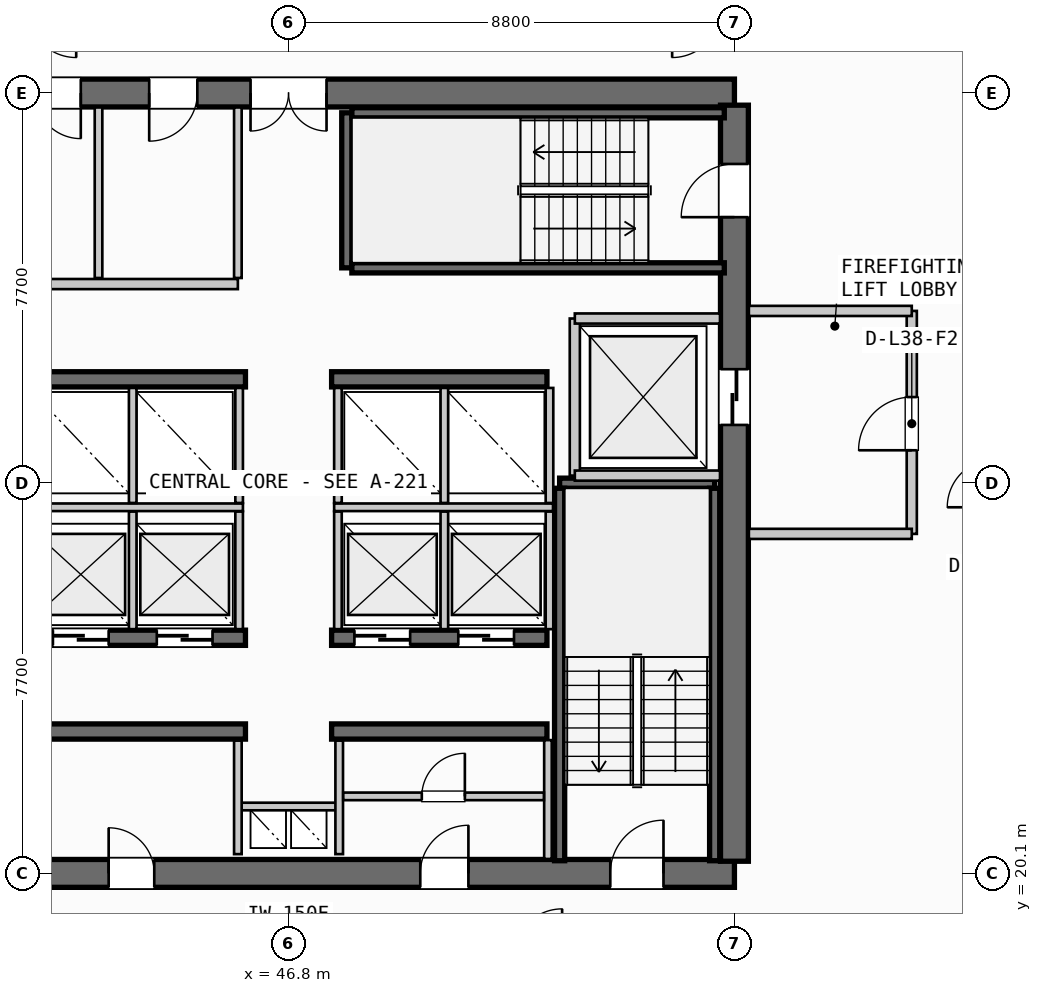
"""IFC4 building model, lengths in metres.
Left out: names, types, materials, properties, quantities, classifications, styles, units other than length and angle.
Written with IfcOpenShell. Run it as: python <this file> out.ifc"""

import sys

from ifc_helpers import new_model, si_unit, direction, frame, frame_2d, origin, place, context, subcontext, project, spatial, rectangle, extrude, source, transform, mapped, element, fill, save


model = new_model("IFC4")
c1 = context("Model", 3, precision=1e-05, world=origin(), true_north=direction((0.0, 1.0)))
c2 = subcontext(c1, "Body", "Model", "MODEL_VIEW")
j1 = project(units=[si_unit("LENGTHUNIT", "METRE"), si_unit("PLANEANGLEUNIT", "RADIAN")], contexts=[c1])
p1 = place(None, origin())
s1 = spatial("IfcSite", under=j1, at=p1, CompositionType="ELEMENT")
p2 = place(p1, origin())
s2 = spatial("IfcBuilding", under=s1, at=p2, CompositionType="ELEMENT")
p3 = place(p2, frame((0.0, 0.0, 150.1)))
s3 = spatial("IfcBuildingStorey", under=s2, at=p3, CompositionType="ELEMENT", Elevation=150.1)
p4 = place(p3, frame((38.0, 20.1, 0.0), z_axis=(0.0, 0.0, 1.0), x_axis=(1.0, 0.0, 0.0)))
e1 = element("IfcWall", 1, at=p4, inside=s3, PredefinedType="SHEAR", context=c2, shape_type="SweptSolid", body=[
    extrude(rectangle(XDim=17.6, YDim=0.55, at=frame_2d((8.8, 0.0))), origin(), (0.0, 0.0, 1.0), 3.3),
])
p5 = place(p4, frame((1.4, 0.0, 0.0)))
e2 = element("IfcOpeningElement", 2, at=p5, cuts=e1, PredefinedType="OPENING", context=c2, shape_type="SweptSolid", body=[
    extrude(rectangle(XDim=1.05, YDim=2.15, at=frame_2d((0.525, 1.075))), frame((0.0, 0.285, 0.0), z_axis=(0.0, -1.0, 0.0), x_axis=(1.0, 0.0, 0.0)), (0.0, 0.0, 1.0), 0.57),
])
p6 = place(p4, frame((15.15, 0.0, 0.0)))
e3 = element("IfcOpeningElement", 3, at=p6, cuts=e1, PredefinedType="OPENING", context=c2, shape_type="SweptSolid", body=[
    extrude(rectangle(XDim=1.05, YDim=2.15, at=frame_2d((0.525, 1.075))), frame((0.0, 0.285, 0.0), z_axis=(0.0, -1.0, 0.0), x_axis=(1.0, 0.0, 0.0)), (0.0, 0.0, 1.0), 0.57),
])
p7 = place(p4, frame((5.25, 0.0, 0.0)))
e4 = element("IfcOpeningElement", 4, at=p7, cuts=e1, PredefinedType="OPENING", context=c2, shape_type="SweptSolid", body=[
    extrude(rectangle(XDim=0.9, YDim=2.15, at=frame_2d((0.45, 1.075))), frame((0.0, 0.285, 0.0), z_axis=(0.0, -1.0, 0.0), x_axis=(1.0, 0.0, 0.0)), (0.0, 0.0, 1.0), 0.57),
])
p8 = place(p4, frame((11.4, 0.0, 0.0)))
e5 = element("IfcOpeningElement", 5, at=p8, cuts=e1, PredefinedType="OPENING", context=c2, shape_type="SweptSolid", body=[
    extrude(rectangle(XDim=0.95, YDim=2.15, at=frame_2d((0.475, 1.075))), frame((0.0, 0.285, 0.0), z_axis=(0.0, -1.0, 0.0), x_axis=(1.0, 0.0, 0.0)), (0.0, 0.0, 1.0), 0.57),
])
p9 = place(p3, frame((55.6, 35.5, 0.0), z_axis=(0.0, 0.0, 1.0), x_axis=(-1.0, 0.0, 0.0)))
e6 = element("IfcWall", 6, at=p9, inside=s3, PredefinedType="SHEAR", context=c2, shape_type="SweptSolid", body=[
    extrude(rectangle(XDim=17.6, YDim=0.55, at=frame_2d((8.8, 0.0))), origin(), (0.0, 0.0, 1.0), 3.3),
])
p10 = place(p9, frame((8.05, 0.0, 0.0)))
e7 = element("IfcOpeningElement", 7, at=p10, cuts=e6, PredefinedType="OPENING", context=c2, shape_type="SweptSolid", body=[
    extrude(rectangle(XDim=1.5, YDim=2.2, at=frame_2d((0.75, 1.1))), frame((0.0, 0.285, 0.0), z_axis=(0.0, -1.0, 0.0), x_axis=(1.0, 0.0, 0.0)), (0.0, 0.0, 1.0), 0.57),
])
p11 = place(p9, frame((14.95, 0.0, 0.0)))
e8 = element("IfcOpeningElement", 8, at=p11, cuts=e6, PredefinedType="OPENING", context=c2, shape_type="SweptSolid", body=[
    extrude(rectangle(XDim=1.4, YDim=2.3, at=frame_2d((0.7, 1.15))), frame((0.0, 0.285, 0.0), z_axis=(0.0, -1.0, 0.0), x_axis=(1.0, 0.0, 0.0)), (0.0, 0.0, 1.0), 0.57),
])
p12 = place(p9, frame((12.9, 0.0, 0.0)))
e9 = element("IfcOpeningElement", 9, at=p12, cuts=e6, PredefinedType="OPENING", context=c2, shape_type="SweptSolid", body=[
    extrude(rectangle(XDim=0.9, YDim=2.15, at=frame_2d((0.45, 1.075))), frame((0.0, 0.285, 0.0), z_axis=(0.0, -1.0, 0.0), x_axis=(1.0, 0.0, 0.0)), (0.0, 0.0, 1.0), 0.57),
])
p13 = place(p9, frame((10.6, 0.0, 0.0)))
e10 = element("IfcOpeningElement", 10, at=p13, cuts=e6, PredefinedType="OPENING", context=c2, shape_type="SweptSolid", body=[
    extrude(rectangle(XDim=0.95, YDim=2.15, at=frame_2d((0.475, 1.075))), frame((0.0, 0.285, 0.0), z_axis=(0.0, -1.0, 0.0), x_axis=(1.0, 0.0, 0.0)), (0.0, 0.0, 1.0), 0.57),
])
p14 = place(p3, frame((55.6, 20.34, 0.0), z_axis=(0.0, 0.0, 1.0), x_axis=(0.0, 1.0, 0.0)))
e11 = element("IfcWall", 11, at=p14, inside=s3, PredefinedType="SHEAR", context=c2, shape_type="SweptSolid", body=[
    extrude(rectangle(XDim=14.92, YDim=0.55, at=frame_2d((7.46, 0.0))), origin(), (0.0, 0.0, 1.0), 3.3),
])
p15 = place(p14, frame((12.71, 0.0, 0.0)))
e12 = element("IfcOpeningElement", 12, at=p15, cuts=e11, PredefinedType="OPENING", context=c2, shape_type="SweptSolid", body=[
    extrude(rectangle(XDim=1.05, YDim=2.15, at=frame_2d((0.525, 1.075))), frame((0.0, 0.285, 0.0), z_axis=(0.0, -1.0, 0.0), x_axis=(1.0, 0.0, 0.0)), (0.0, 0.0, 1.0), 0.57),
])
p16 = place(p14, frame((8.61, 0.0, 0.0)))
e13 = element("IfcOpeningElement", 13, at=p16, cuts=e11, PredefinedType="OPENING", context=c2, shape_type="SweptSolid", body=[
    extrude(rectangle(XDim=1.1, YDim=2.2, at=frame_2d((0.55, 1.1))), frame((0.0, 0.285, 0.0), z_axis=(0.0, -1.0, 0.0), x_axis=(1.0, 0.0, 0.0)), (0.0, 0.0, 1.0), 0.57),
])
for number, where, z_axis, x_axis in (
    (14, (41.7, 22.9, 0.0), (0.0, 0.0, 1.0), (1.0, 0.0, 0.0)),
    (15, (47.65, 22.9, 0.0), (0.0, 0.0, 1.0), (1.0, 0.0, 0.0)),
):
    element("IfcWall", number, at=place(p3, frame(where, z_axis=z_axis, x_axis=x_axis)), inside=s3, PredefinedType="SHEAR", context=c2, shape_type="SweptSolid", body=[
        extrude(rectangle(XDim=4.25, YDim=0.3, at=frame_2d((2.125, 0.0))), origin(), (0.0, 0.0, 1.0), 3.3),
    ])
p17 = place(p3, frame((41.7, 24.75, 0.0), z_axis=(0.0, 0.0, 1.0), x_axis=(1.0, 0.0, 0.0)))
e16 = element("IfcWall", 16, at=p17, inside=s3, PredefinedType="SHEAR", context=c2, shape_type="SweptSolid", body=[
    extrude(rectangle(XDim=4.25, YDim=0.3, at=frame_2d((2.125, 0.0))), origin(), (0.0, 0.0, 1.0), 3.3),
])
p18 = place(p17, frame((0.45, 0.0, 0.0)))
e17 = element("IfcOpeningElement", 17, at=p18, cuts=e16, PredefinedType="OPENING", context=c2, shape_type="SweptSolid", body=[
    extrude(rectangle(XDim=1.1, YDim=2.2, at=frame_2d((0.55, 1.1))), frame((0.0, 0.16, 0.0), z_axis=(0.0, -1.0, 0.0), x_axis=(1.0, 0.0, 0.0)), (0.0, 0.0, 1.0), 0.32),
])
p19 = place(p17, frame((2.5, 0.0, 0.0)))
e18 = element("IfcOpeningElement", 18, at=p19, cuts=e16, PredefinedType="OPENING", context=c2, shape_type="SweptSolid", body=[
    extrude(rectangle(XDim=1.1, YDim=2.2, at=frame_2d((0.55, 1.1))), frame((0.0, 0.16, 0.0), z_axis=(0.0, -1.0, 0.0), x_axis=(1.0, 0.0, 0.0)), (0.0, 0.0, 1.0), 0.32),
])
p20 = place(p3, frame((47.65, 24.75, 0.0), z_axis=(0.0, 0.0, 1.0), x_axis=(1.0, 0.0, 0.0)))
e19 = element("IfcWall", 19, at=p20, inside=s3, PredefinedType="SHEAR", context=c2, shape_type="SweptSolid", body=[
    extrude(rectangle(XDim=4.25, YDim=0.3, at=frame_2d((2.125, 0.0))), origin(), (0.0, 0.0, 1.0), 3.3),
])
p21 = place(p20, frame((0.45, 0.0, 0.0)))
e20 = element("IfcOpeningElement", 20, at=p21, cuts=e19, PredefinedType="OPENING", context=c2, shape_type="SweptSolid", body=[
    extrude(rectangle(XDim=1.1, YDim=2.2, at=frame_2d((0.55, 1.1))), frame((0.0, 0.16, 0.0), z_axis=(0.0, -1.0, 0.0), x_axis=(1.0, 0.0, 0.0)), (0.0, 0.0, 1.0), 0.32),
])
p22 = place(p20, frame((2.5, 0.0, 0.0)))
e21 = element("IfcOpeningElement", 21, at=p22, cuts=e19, PredefinedType="OPENING", context=c2, shape_type="SweptSolid", body=[
    extrude(rectangle(XDim=1.1, YDim=2.2, at=frame_2d((0.55, 1.1))), frame((0.0, 0.16, 0.0), z_axis=(0.0, -1.0, 0.0), x_axis=(1.0, 0.0, 0.0)), (0.0, 0.0, 1.0), 0.32),
])
for number, where, z_axis, x_axis in (
    (22, (41.7, 29.85, 0.0), (0.0, 0.0, 1.0), (1.0, 0.0, 0.0)),
    (23, (47.65, 29.85, 0.0), (0.0, 0.0, 1.0), (1.0, 0.0, 0.0)),
):
    element("IfcWall", number, at=place(p3, frame(where, z_axis=z_axis, x_axis=x_axis)), inside=s3, PredefinedType="SHEAR", context=c2, shape_type="SweptSolid", body=[
        extrude(rectangle(XDim=4.25, YDim=0.3, at=frame_2d((2.125, 0.0))), origin(), (0.0, 0.0, 1.0), 3.3),
    ])
p23 = place(p3, frame((52.15, 27.8, 0.0), z_axis=(0.0, 0.0, 1.0), x_axis=(1.0, 0.0, 0.0)))
e24 = element("IfcWall", 24, at=p23, inside=s3, PredefinedType="SHEAR", context=c2, shape_type="SweptSolid", body=[
    extrude(rectangle(XDim=3.06, YDim=0.2, at=frame_2d((1.53, 0.0))), origin(), (0.0, 0.0, 1.0), 3.3),
])
for number, where, z_axis, x_axis in (
    (25, (55.21, 27.7, 0.0), (0.0, 0.0, 1.0), (0.0, -1.0, 0.0)),
    (26, (52.15, 20.35, 0.0), (0.0, 0.0, 1.0), (0.0, 1.0, 0.0)),
):
    element("IfcWall", number, at=place(p3, frame(where, z_axis=z_axis, x_axis=x_axis)), inside=s3, PredefinedType="SHEAR", context=c2, shape_type="SweptSolid", body=[
        extrude(rectangle(XDim=7.35, YDim=0.2, at=frame_2d((3.675, 0.0))), origin(), (0.0, 0.0, 1.0), 3.3),
    ])
p24 = place(p3, frame((47.95, 32.05, 0.0), z_axis=(0.0, 0.0, 1.0), x_axis=(0.0, 1.0, 0.0)))
e27 = element("IfcWall", 27, at=p24, inside=s3, PredefinedType="SHEAR", context=c2, shape_type="SweptSolid", body=[
    extrude(rectangle(XDim=3.06, YDim=0.2, at=frame_2d((1.53, 0.0))), origin(), (0.0, 0.0, 1.0), 3.3),
])
for number, where, z_axis, x_axis in (
    (28, (48.05, 35.11, 0.0), (0.0, 0.0, 1.0), (1.0, 0.0, 0.0)),
    (29, (55.4, 32.05, 0.0), (0.0, 0.0, 1.0), (-1.0, 0.0, 0.0)),
):
    element("IfcWall", number, at=place(p3, frame(where, z_axis=z_axis, x_axis=x_axis)), inside=s3, PredefinedType="SHEAR", context=c2, shape_type="SweptSolid", body=[
        extrude(rectangle(XDim=7.35, YDim=0.2, at=frame_2d((3.675, 0.0))), origin(), (0.0, 0.0, 1.0), 3.3),
    ])
p25 = place(p3, frame((45.8, 21.42, 0.0), z_axis=(0.0, 0.0, 1.0), x_axis=(1.0, 0.0, 0.0)))
e30 = element("IfcWall", 30, at=p25, inside=s3, PredefinedType="PARTITIONING", context=c2, shape_type="SweptSolid", body=[
    extrude(rectangle(XDim=2.0, YDim=0.15, at=frame_2d((1.0, 0.0))), origin(), (0.0, 0.0, 1.0), 2.28),
])
for number, where, z_axis, x_axis in (
    (31, (45.8, 20.48, 0.0), (0.0, 0.0, 1.0), (0.0, 1.0, 0.0)),
    (32, (47.8, 20.48, 0.0), (0.0, 0.0, 1.0), (0.0, 1.0, 0.0)),
):
    element("IfcWall", number, at=place(p3, frame(where, z_axis=z_axis, x_axis=x_axis)), inside=s3, PredefinedType="PARTITIONING", context=c2, shape_type="SweptSolid", body=[
        extrude(rectangle(XDim=2.24, YDim=0.15, at=frame_2d((1.12, 0.0))), origin(), (0.0, 0.0, 1.0), 2.28),
    ])
p26 = place(p3, frame((52.45, 27.95, 0.0), z_axis=(0.0, 0.0, 1.0), x_axis=(0.0, 1.0, 0.0)))
e33 = element("IfcWall", 33, at=p26, inside=s3, PredefinedType="PARTITIONING", context=c2, shape_type="SweptSolid", body=[
    extrude(rectangle(XDim=3.1, YDim=0.2, at=frame_2d((1.55, 0.0))), origin(), (0.0, 0.0, 1.0), 2.28),
])
for number, where, z_axis, x_axis in (
    (34, (52.45, 27.95, 0.0), (0.0, 0.0, 1.0), (1.0, 0.0, 0.0)),
    (35, (52.45, 31.05, 0.0), (0.0, 0.0, 1.0), (1.0, 0.0, 0.0)),
):
    element("IfcWall", number, at=place(p3, frame(where, z_axis=z_axis, x_axis=x_axis)), inside=s3, PredefinedType="PARTITIONING", context=c2, shape_type="SweptSolid", body=[
        extrude(rectangle(XDim=2.865, YDim=0.2, at=frame_2d((1.433, 0.0))), origin(), (0.0, 0.0, 1.0), 2.28),
    ])
p27 = place(p3, frame((59.1, 26.8, 0.0), z_axis=(0.0, 0.0, 1.0), x_axis=(0.0, 1.0, 0.0)))
e36 = element("IfcWall", 36, at=p27, inside=s3, PredefinedType="PARTITIONING", context=c2, shape_type="SweptSolid", body=[
    extrude(rectangle(XDim=4.4, YDim=0.2, at=frame_2d((2.2, 0.0))), origin(), (0.0, 0.0, 1.0), 2.28),
])
p28 = place(p27, frame((1.65, 0.0, 0.0)))
e37 = element("IfcOpeningElement", 37, at=p28, cuts=e36, PredefinedType="OPENING", context=c2, shape_type="SweptSolid", body=[
    extrude(rectangle(XDim=1.05, YDim=2.15, at=frame_2d((0.525, 1.075))), frame((0.0, 0.11, 0.0), z_axis=(0.0, -1.0, 0.0), x_axis=(1.0, 0.0, 0.0)), (0.0, 0.0, 1.0), 0.22),
])
for number, where, z_axis, x_axis in (
    (38, (55.885, 26.8, 0.0), (0.0, 0.0, 1.0), (1.0, 0.0, 0.0)),
    (39, (55.885, 31.2, 0.0), (0.0, 0.0, 1.0), (1.0, 0.0, 0.0)),
):
    element("IfcWall", number, at=place(p3, frame(where, z_axis=z_axis, x_axis=x_axis)), inside=s3, PredefinedType="PARTITIONING", context=c2, shape_type="SweptSolid", body=[
        extrude(rectangle(XDim=3.215, YDim=0.2, at=frame_2d((1.607, 0.0))), origin(), (0.0, 0.0, 1.0), 2.28),
    ])
p29 = place(p3, frame((51.92, 20.385, 0.0), z_axis=(0.0, 0.0, 1.0), x_axis=(0.0, 1.0, 0.0)))
e40 = element("IfcWall", 40, at=p29, inside=s3, PredefinedType="PARTITIONING", context=c2, shape_type="SweptSolid", body=[
    extrude(rectangle(XDim=2.345, YDim=0.15, at=frame_2d((1.172, 0.0))), origin(), (0.0, 0.0, 1.0), 2.28),
])
p30 = place(p3, frame((47.88, 21.62, 0.0), z_axis=(0.0, 0.0, 1.0), x_axis=(1.0, 0.0, 0.0)))
e41 = element("IfcWall", 41, at=p30, inside=s3, PredefinedType="PARTITIONING", context=c2, shape_type="SweptSolid", body=[
    extrude(rectangle(XDim=3.96, YDim=0.15, at=frame_2d((1.98, 0.0))), origin(), (0.0, 0.0, 1.0), 2.28),
])
p31 = place(p30, frame((1.55, 0.0, 0.0)))
e42 = element("IfcOpeningElement", 42, at=p31, cuts=e41, PredefinedType="OPENING", context=c2, shape_type="SweptSolid", body=[
    extrude(rectangle(XDim=0.85, YDim=2.15, at=frame_2d((0.425, 1.075))), frame((0.0, 0.085, 0.0), z_axis=(0.0, -1.0, 0.0), x_axis=(1.0, 0.0, 0.0)), (0.0, 0.0, 1.0), 0.17),
])
p32 = place(p3, frame((41.58, 27.325, 0.0), z_axis=(0.0, 0.0, 1.0), x_axis=(1.0, 0.0, 0.0)))
e43 = element("IfcWall", 43, at=p32, inside=s3, PredefinedType="PARTITIONING", context=c2, shape_type="SweptSolid", body=[
    extrude(rectangle(XDim=4.32, YDim=0.15, at=frame_2d((2.16, 0.0))), origin(), (0.0, 0.0, 1.0), 2.28),
])
p33 = place(p3, frame((47.7, 27.325, 0.0), z_axis=(0.0, 0.0, 1.0), x_axis=(1.0, 0.0, 0.0)))
e44 = element("IfcWall", 44, at=p33, inside=s3, PredefinedType="PARTITIONING", context=c2, shape_type="SweptSolid", body=[
    extrude(rectangle(XDim=4.32, YDim=0.15, at=frame_2d((2.16, 0.0))), origin(), (0.0, 0.0, 1.0), 2.28),
])
for number, where, z_axis, x_axis in (
    (45, (43.725, 24.92, 0.0), (0.0, 0.0, 1.0), (0.0, 1.0, 0.0)),
    (46, (45.825, 24.92, 0.0), (0.0, 0.0, 1.0), (0.0, 1.0, 0.0)),
    (47, (47.775, 24.92, 0.0), (0.0, 0.0, 1.0), (0.0, 1.0, 0.0)),
    (48, (49.875, 24.92, 0.0), (0.0, 0.0, 1.0), (0.0, 1.0, 0.0)),
    (49, (51.95, 24.92, 0.0), (0.0, 0.0, 1.0), (0.0, 1.0, 0.0)),
):
    element("IfcWall", number, at=place(p3, frame(where, z_axis=z_axis, x_axis=x_axis)), inside=s3, PredefinedType="PARTITIONING", context=c2, shape_type="SweptSolid", body=[
        extrude(rectangle(XDim=2.32, YDim=0.15, at=frame_2d((1.16, 0.0))), origin(), (0.0, 0.0, 1.0), 2.28),
    ])
for number, where, z_axis, x_axis in (
    (50, (43.725, 27.41, 0.0), (0.0, 0.0, 1.0), (0.0, 1.0, 0.0)),
    (51, (45.825, 27.41, 0.0), (0.0, 0.0, 1.0), (0.0, 1.0, 0.0)),
    (52, (47.775, 27.41, 0.0), (0.0, 0.0, 1.0), (0.0, 1.0, 0.0)),
    (53, (49.875, 27.41, 0.0), (0.0, 0.0, 1.0), (0.0, 1.0, 0.0)),
    (54, (51.95, 27.41, 0.0), (0.0, 0.0, 1.0), (0.0, 1.0, 0.0)),
):
    element("IfcWall", number, at=place(p3, frame(where, z_axis=z_axis, x_axis=x_axis)), inside=s3, PredefinedType="PARTITIONING", context=c2, shape_type="SweptSolid", body=[
        extrude(rectangle(XDim=2.27, YDim=0.15, at=frame_2d((1.135, 0.0))), origin(), (0.0, 0.0, 1.0), 2.28),
    ])
p34 = place(p3, frame((38.285, 31.73, 0.0), z_axis=(0.0, 0.0, 1.0), x_axis=(1.0, 0.0, 0.0)))
e55 = element("IfcWall", 55, at=p34, inside=s3, PredefinedType="PARTITIONING", context=c2, shape_type="SweptSolid", body=[
    extrude(rectangle(XDim=7.515, YDim=0.2, at=frame_2d((3.758, 0.0))), origin(), (0.0, 0.0, 1.0), 2.28),
])
p35 = place(p3, frame((45.8, 31.85, 0.0), z_axis=(0.0, 0.0, 1.0), x_axis=(0.0, 1.0, 0.0)))
e56 = element("IfcWall", 56, at=p35, inside=s3, PredefinedType="PARTITIONING", context=c2, shape_type="SweptSolid", body=[
    extrude(rectangle(XDim=3.365, YDim=0.15, at=frame_2d((1.683, 0.0))), origin(), (0.0, 0.0, 1.0), 2.28),
])
p36 = place(p3, frame((43.05, 31.85, 0.0), z_axis=(0.0, 0.0, 1.0), x_axis=(0.0, 1.0, 0.0)))
e57 = element("IfcWall", 57, at=p36, inside=s3, PredefinedType="PLUMBINGWALL", context=c2, shape_type="SweptSolid", body=[
    extrude(rectangle(XDim=3.365, YDim=0.15, at=frame_2d((1.683, 0.0))), origin(), (0.0, 0.0, 1.0), 2.28),
])
m1 = source(origin(), c2, "Body", "SweptSolid", [
    extrude(rectangle(XDim=1.05, YDim=2.15, at=frame_2d((0.525, 1.075))), frame((0.0, 0.025, 0.0), z_axis=(0.0, -1.0, 0.0), x_axis=(1.0, 0.0, 0.0)), (0.0, 0.0, 1.0), 0.05),
])
p37 = place(p6, origin())
e58 = element("IfcDoor", 58, at=p37, inside=s3, OperationType="SINGLE_SWING_RIGHT", PredefinedType="DOOR", context=c2, shape_type="MappedRepresentation", body=[
    mapped(m1, transform((0.0, 0.0, 0.0), scale=1.0)),
])
fill(e3, e58)
p38 = place(p15, origin())
e59 = element("IfcDoor", 59, at=p38, inside=s3, OperationType="SINGLE_SWING_LEFT", PredefinedType="DOOR", context=c2, shape_type="MappedRepresentation", body=[
    mapped(m1, transform((0.0, 0.0, 0.0), scale=1.0)),
])
fill(e12, e59)
m2 = source(origin(), c2, "Body", "SweptSolid", [
    extrude(rectangle(XDim=1.5, YDim=2.2, at=frame_2d((0.75, 1.1))), frame((0.0, 0.025, 0.0), z_axis=(0.0, -1.0, 0.0), x_axis=(1.0, 0.0, 0.0)), (0.0, 0.0, 1.0), 0.05),
])
p39 = place(p10, origin())
e60 = element("IfcDoor", 60, at=p39, inside=s3, OperationType="DOUBLE_DOOR_SINGLE_SWING", PredefinedType="DOOR", context=c2, shape_type="MappedRepresentation", body=[
    mapped(m2, transform((0.0, 0.0, 0.0), scale=1.0)),
])
fill(e7, e60)
m3 = source(origin(), c2, "Body", "SweptSolid", [
    extrude(rectangle(XDim=1.1, YDim=2.2, at=frame_2d((0.55, 1.1))), frame((0.0, 0.025, 0.0), z_axis=(0.0, -1.0, 0.0), x_axis=(1.0, 0.0, 0.0)), (0.0, 0.0, 1.0), 0.05),
])
p40 = place(p16, origin())
e61 = element("IfcDoor", 61, at=p40, inside=s3, OperationType="SLIDING_TO_RIGHT", PredefinedType="DOOR", context=c2, shape_type="MappedRepresentation", body=[
    mapped(m3, transform((0.0, 0.0, 0.0), scale=1.0)),
])
fill(e13, e61)
m4 = source(origin(), c2, "Body", "SweptSolid", [
    extrude(rectangle(XDim=0.9, YDim=2.15, at=frame_2d((0.45, 1.075))), frame((0.0, 0.025, 0.0), z_axis=(0.0, -1.0, 0.0), x_axis=(1.0, 0.0, 0.0)), (0.0, 0.0, 1.0), 0.05),
])
p41 = place(p7, origin())
e62 = element("IfcDoor", 62, at=p41, inside=s3, OperationType="SINGLE_SWING_LEFT", PredefinedType="DOOR", context=c2, shape_type="MappedRepresentation", body=[
    mapped(m4, transform((0.0, 0.0, 0.0), scale=1.0)),
])
fill(e4, e62)
m5 = source(origin(), c2, "Body", "SweptSolid", [
    extrude(rectangle(XDim=0.95, YDim=2.15, at=frame_2d((0.475, 1.075))), frame((0.0, 0.025, 0.0), z_axis=(0.0, -1.0, 0.0), x_axis=(1.0, 0.0, 0.0)), (0.0, 0.0, 1.0), 0.05),
])
p42 = place(p8, origin())
e63 = element("IfcDoor", 63, at=p42, inside=s3, OperationType="SINGLE_SWING_RIGHT", PredefinedType="DOOR", context=c2, shape_type="MappedRepresentation", body=[
    mapped(m5, transform((0.0, 0.0, 0.0), scale=1.0)),
])
fill(e5, e63)
p43 = place(p18, origin())
e64 = element("IfcDoor", 64, at=p43, inside=s3, OperationType="SLIDING_TO_RIGHT", PredefinedType="DOOR", context=c2, shape_type="MappedRepresentation", body=[
    mapped(m3, transform((0.0, 0.0, 0.0), scale=1.0)),
])
fill(e17, e64)
p44 = place(p19, origin())
e65 = element("IfcDoor", 65, at=p44, inside=s3, OperationType="SLIDING_TO_RIGHT", PredefinedType="DOOR", context=c2, shape_type="MappedRepresentation", body=[
    mapped(m3, transform((0.0, 0.0, 0.0), scale=1.0)),
])
fill(e18, e65)
p45 = place(p21, origin())
e66 = element("IfcDoor", 66, at=p45, inside=s3, OperationType="SLIDING_TO_RIGHT", PredefinedType="DOOR", context=c2, shape_type="MappedRepresentation", body=[
    mapped(m3, transform((0.0, 0.0, 0.0), scale=1.0)),
])
fill(e20, e66)
p46 = place(p22, origin())
e67 = element("IfcDoor", 67, at=p46, inside=s3, OperationType="SLIDING_TO_RIGHT", PredefinedType="DOOR", context=c2, shape_type="MappedRepresentation", body=[
    mapped(m3, transform((0.0, 0.0, 0.0), scale=1.0)),
])
fill(e21, e67)
p47 = place(p12, origin())
e68 = element("IfcDoor", 68, at=p47, inside=s3, OperationType="SINGLE_SWING_LEFT", PredefinedType="DOOR", context=c2, shape_type="MappedRepresentation", body=[
    mapped(m4, transform((0.0, 0.0, 0.0), scale=1.0)),
])
fill(e9, e68)
p48 = place(p13, origin())
e69 = element("IfcDoor", 69, at=p48, inside=s3, OperationType="SINGLE_SWING_RIGHT", PredefinedType="DOOR", context=c2, shape_type="MappedRepresentation", body=[
    mapped(m5, transform((0.0, 0.0, 0.0), scale=1.0)),
])
fill(e10, e69)
p49 = place(p28, origin())
e70 = element("IfcDoor", 70, at=p49, inside=s3, OperationType="SINGLE_SWING_LEFT", PredefinedType="DOOR", context=c2, shape_type="MappedRepresentation", body=[
    mapped(m1, transform((0.0, 0.0, 0.0), scale=1.0)),
])
fill(e37, e70)
m6 = source(origin(), c2, "Body", "SweptSolid", [
    extrude(rectangle(XDim=0.85, YDim=2.15, at=frame_2d((0.425, 1.075))), frame((0.0, 0.025, 0.0), z_axis=(0.0, -1.0, 0.0), x_axis=(1.0, 0.0, 0.0)), (0.0, 0.0, 1.0), 0.05),
])
p50 = place(p31, origin())
e71 = element("IfcDoor", 71, at=p50, inside=s3, OperationType="SINGLE_SWING_RIGHT", PredefinedType="DOOR", context=c2, shape_type="MappedRepresentation", body=[
    mapped(m6, transform((0.0, 0.0, 0.0), scale=1.0)),
])
fill(e42, e71)
save(model, sys.argv[1])
